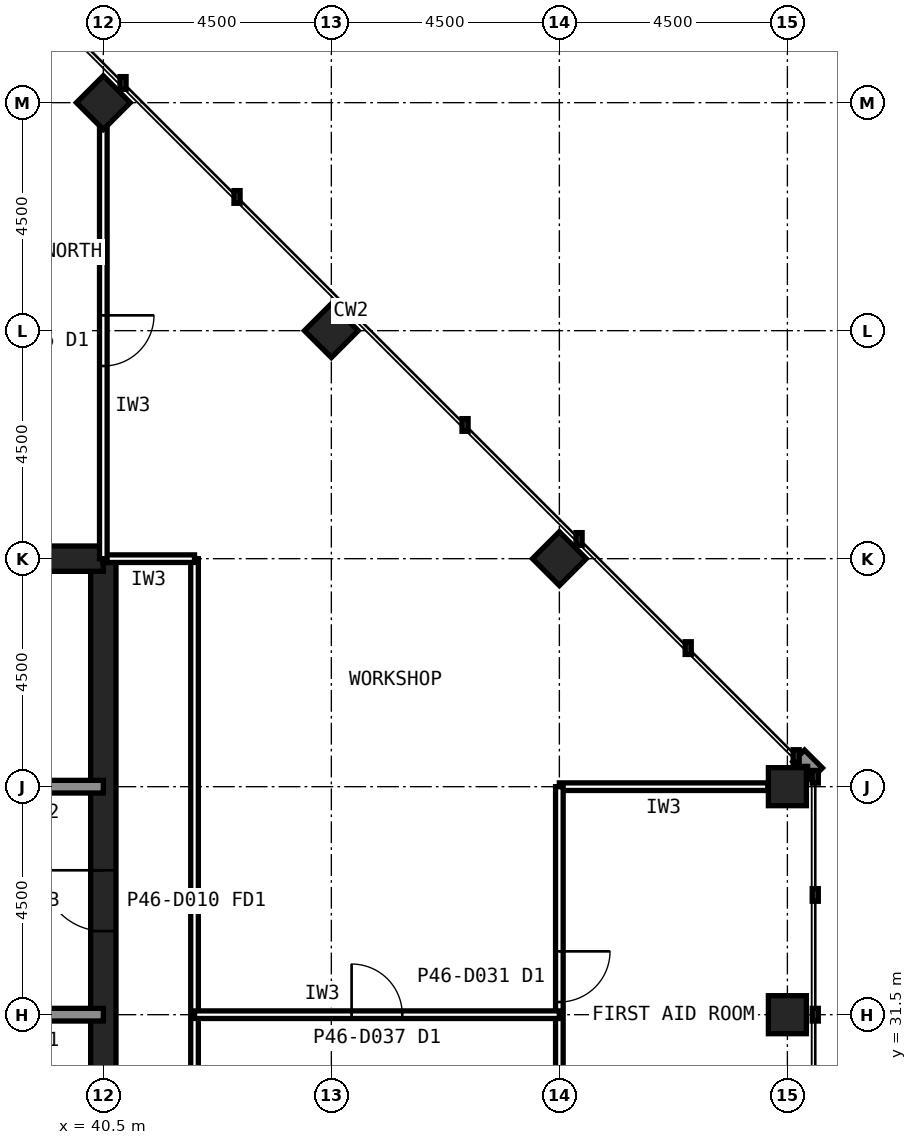
"""IFC4 building model, lengths in metres.
Left out: names, types, materials, properties, quantities, classifications, styles, units other than length and angle.
Written with IfcOpenShell. Run it as: python <this file> out.ifc"""

import sys

from ifc_helpers import new_model, si_unit, direction, frame, frame_2d, origin, origin_2d, place, context, subcontext, project, spatial, rectangle, hollow_rectangle, extrude, element, fill, save


model = new_model("IFC4")
c1 = context("Model", 3, precision=1e-05, world=origin(), true_north=direction((0.0, 1.0)))
c2 = subcontext(c1, "Body", "Model", "MODEL_VIEW")
j1 = project(units=[si_unit("LENGTHUNIT", "METRE"), si_unit("PLANEANGLEUNIT", "RADIAN")], contexts=[c1])
p1 = place(None, origin())
s1 = spatial("IfcSite", under=j1, at=p1, CompositionType="ELEMENT")
p2 = place(p1, origin())
s2 = spatial("IfcBuilding", under=s1, at=p2, CompositionType="ELEMENT")
p3 = place(p2, frame((0.0, 0.0, 191.6)))
s3 = spatial("IfcBuildingStorey", under=s2, at=p3, CompositionType="ELEMENT", Elevation=191.6)
for number, where, z_axis, x_axis in (
    (1, (54.0, 31.5, 0.0), (0.0, 0.0, 1.0), (1.0, 0.0, 0.0)),
    (2, (54.0, 36.0, 0.0), (0.0, 0.0, 1.0), (1.0, 0.0, 0.0)),
    (3, (49.5, 40.5, 0.0), (0.0, 0.0, 1.0), (0.707, 0.707, 0.0)),
    (4, (45.0, 45.0, 0.0), (0.0, 0.0, 1.0), (0.707, 0.707, 0.0)),
    (5, (40.5, 49.5, 0.0), (0.0, 0.0, 1.0), (0.707, 0.707, 0.0)),
):
    element("IfcColumn", number, at=place(p3, frame(where, z_axis=z_axis, x_axis=x_axis)), inside=s3, PredefinedType="COLUMN", context=c2, shape_type="SweptSolid", body=[
        extrude(hollow_rectangle(XDim=0.75, YDim=0.75, WallThickness=0.04, at=origin_2d()), origin(), (0.0, 0.0, 1.0), 4.0),
    ])
p4 = place(p3, frame((40.5, 13.5, 0.0), z_axis=(0.0, 0.0, 1.0), x_axis=(0.0, 1.0, 0.0)))
e6 = element("IfcWall", 6, at=p4, inside=s3, PredefinedType="SHEAR", context=c2, shape_type="SweptSolid", body=[
    extrude(rectangle(XDim=27.0, YDim=0.5, at=frame_2d((13.5, 0.0))), origin(), (0.0, 0.0, 1.0), 4.0),
])
p5 = place(p4, frame((5.85, 0.0, 0.0)))
e7 = element("IfcOpeningElement", 7, at=p5, cuts=e6, PredefinedType="OPENING", context=c2, shape_type="SweptSolid", body=[
    extrude(rectangle(XDim=1.8, YDim=2.1, at=frame_2d((0.9, 1.05))), frame((0.0, 0.26, 0.0), z_axis=(0.0, -1.0, 0.0), x_axis=(1.0, 0.0, 0.0)), (0.0, 0.0, 1.0), 0.52),
])
p6 = place(p4, frame((19.65, 0.0, 0.0)))
e8 = element("IfcOpeningElement", 8, at=p6, cuts=e6, PredefinedType="OPENING", context=c2, shape_type="SweptSolid", body=[
    extrude(rectangle(XDim=1.2, YDim=2.1, at=frame_2d((0.6, 1.05))), frame((0.0, 0.26, 0.0), z_axis=(0.0, -1.0, 0.0), x_axis=(1.0, 0.0, 0.0)), (0.0, 0.0, 1.0), 0.52),
])
p7 = place(p3, frame((40.5, 40.5, 0.0), z_axis=(0.0, 0.0, 1.0), x_axis=(-1.0, 0.0, 0.0)))
e9 = element("IfcWall", 9, at=p7, inside=s3, PredefinedType="SHEAR", context=c2, shape_type="SweptSolid", body=[
    extrude(rectangle(XDim=27.0, YDim=0.5, at=frame_2d((13.5, 0.0))), origin(), (0.0, 0.0, 1.0), 4.0),
])
p8 = place(p3, frame((13.5, 36.0, 0.0), z_axis=(0.0, 0.0, 1.0), x_axis=(1.0, 0.0, 0.0)))
e10 = element("IfcWall", 10, at=p8, inside=s3, PredefinedType="SOLIDWALL", context=c2, shape_type="SweptSolid", body=[
    extrude(rectangle(XDim=27.0, YDim=0.25, at=frame_2d((13.5, 0.0))), origin(), (0.0, 0.0, 1.0), 3.84),
])
p9 = place(p8, frame((1.8, 0.0, 0.0)))
e11 = element("IfcOpeningElement", 11, at=p9, cuts=e10, PredefinedType="OPENING", context=c2, shape_type="SweptSolid", body=[
    extrude(rectangle(XDim=0.9, YDim=2.1, at=frame_2d((0.45, 1.05))), frame((0.0, 0.135, 0.0), z_axis=(0.0, -1.0, 0.0), x_axis=(1.0, 0.0, 0.0)), (0.0, 0.0, 1.0), 0.27),
])
p10 = place(p8, frame((5.55, 0.0, 0.0)))
e12 = element("IfcOpeningElement", 12, at=p10, cuts=e10, PredefinedType="OPENING", context=c2, shape_type="SweptSolid", body=[
    extrude(rectangle(XDim=0.9, YDim=2.1, at=frame_2d((0.45, 1.05))), frame((0.0, 0.135, 0.0), z_axis=(0.0, -1.0, 0.0), x_axis=(1.0, 0.0, 0.0)), (0.0, 0.0, 1.0), 0.27),
])
p11 = place(p8, frame((8.55, 0.0, 0.0)))
e13 = element("IfcOpeningElement", 13, at=p11, cuts=e10, PredefinedType="OPENING", context=c2, shape_type="SweptSolid", body=[
    extrude(rectangle(XDim=0.9, YDim=2.1, at=frame_2d((0.45, 1.05))), frame((0.0, 0.135, 0.0), z_axis=(0.0, -1.0, 0.0), x_axis=(1.0, 0.0, 0.0)), (0.0, 0.0, 1.0), 0.27),
])
p12 = place(p8, frame((11.55, 0.0, 0.0)))
e14 = element("IfcOpeningElement", 14, at=p12, cuts=e10, PredefinedType="OPENING", context=c2, shape_type="SweptSolid", body=[
    extrude(rectangle(XDim=0.9, YDim=2.1, at=frame_2d((0.45, 1.05))), frame((0.0, 0.135, 0.0), z_axis=(0.0, -1.0, 0.0), x_axis=(1.0, 0.0, 0.0)), (0.0, 0.0, 1.0), 0.27),
])
p13 = place(p8, frame((24.1, 0.0, 0.0)))
e15 = element("IfcOpeningElement", 15, at=p13, cuts=e10, PredefinedType="OPENING", context=c2, shape_type="SweptSolid", body=[
    extrude(rectangle(XDim=1.3, YDim=2.2, at=frame_2d((0.65, 1.1))), frame((0.0, 0.135, 0.0), z_axis=(0.0, -1.0, 0.0), x_axis=(1.0, 0.0, 0.0)), (0.0, 0.0, 1.0), 0.27),
])
p14 = place(p3, frame((13.5, 31.5, 0.0), z_axis=(0.0, 0.0, 1.0), x_axis=(1.0, 0.0, 0.0)))
e16 = element("IfcWall", 16, at=p14, inside=s3, PredefinedType="SOLIDWALL", context=c2, shape_type="SweptSolid", body=[
    extrude(rectangle(XDim=27.0, YDim=0.25, at=frame_2d((13.5, 0.0))), origin(), (0.0, 0.0, 1.0), 3.84),
])
p15 = place(p14, frame((24.15, 0.0, 0.0)))
e17 = element("IfcOpeningElement", 17, at=p15, cuts=e16, PredefinedType="OPENING", context=c2, shape_type="SweptSolid", body=[
    extrude(rectangle(XDim=1.2, YDim=2.1, at=frame_2d((0.6, 1.05))), frame((0.0, 0.135, 0.0), z_axis=(0.0, -1.0, 0.0), x_axis=(1.0, 0.0, 0.0)), (0.0, 0.0, 1.0), 0.27),
])
p16 = place(p14, frame((15.3, 0.0, 0.0)))
e18 = element("IfcOpeningElement", 18, at=p16, cuts=e16, PredefinedType="OPENING", context=c2, shape_type="SweptSolid", body=[
    extrude(rectangle(XDim=0.9, YDim=2.1, at=frame_2d((0.45, 1.05))), frame((0.0, 0.135, 0.0), z_axis=(0.0, -1.0, 0.0), x_axis=(1.0, 0.0, 0.0)), (0.0, 0.0, 1.0), 0.27),
])
p17 = place(p14, frame((19.8, 0.0, 0.0)))
e19 = element("IfcOpeningElement", 19, at=p17, cuts=e16, PredefinedType="OPENING", context=c2, shape_type="SweptSolid", body=[
    extrude(rectangle(XDim=0.9, YDim=2.1, at=frame_2d((0.45, 1.05))), frame((0.0, 0.135, 0.0), z_axis=(0.0, -1.0, 0.0), x_axis=(1.0, 0.0, 0.0)), (0.0, 0.0, 1.0), 0.27),
])
p18 = place(p3, frame((42.3, 11.7, 0.0), z_axis=(0.0, 0.0, 1.0), x_axis=(0.0, 1.0, 0.0)))
e20 = element("IfcWall", 20, at=p18, inside=s3, PredefinedType="PARTITIONING", context=c2, shape_type="SweptSolid", body=[
    extrude(rectangle(XDim=30.6, YDim=0.15, at=frame_2d((15.3, 0.0))), origin(), (0.0, 0.0, 1.0), 3.84),
])
p19 = place(p18, frame((14.8, 0.0, 0.0)))
e21 = element("IfcOpeningElement", 21, at=p19, cuts=e20, PredefinedType="OPENING", context=c2, shape_type="SweptSolid", body=[
    extrude(rectangle(XDim=1.0, YDim=2.1, at=frame_2d((0.5, 1.05))), frame((0.0, 0.085, 0.0), z_axis=(0.0, -1.0, 0.0), x_axis=(1.0, 0.0, 0.0)), (0.0, 0.0, 1.0), 0.17),
])
p20 = place(p3, frame((42.3, 42.3, 0.0), z_axis=(0.0, 0.0, 1.0), x_axis=(-1.0, 0.0, 0.0)))
e22 = element("IfcWall", 22, at=p20, inside=s3, PredefinedType="PARTITIONING", context=c2, shape_type="SweptSolid", body=[
    extrude(rectangle(XDim=4.5, YDim=0.15, at=frame_2d((2.25, 0.0))), origin(), (0.0, 0.0, 1.0), 3.84),
])
p21 = place(p3, frame((53.615, 36.0, 0.0), z_axis=(0.0, 0.0, 1.0), x_axis=(-1.0, 0.0, 0.0)))
e23 = element("IfcWall", 23, at=p21, inside=s3, PredefinedType="PARTITIONING", context=c2, shape_type="SweptSolid", body=[
    extrude(rectangle(XDim=4.115, YDim=0.15, at=frame_2d((2.058, 0.0))), origin(), (0.0, 0.0, 1.0), 2.989),
])
p22 = place(p3, frame((49.5, 36.0, 0.0), z_axis=(0.0, 0.0, 1.0), x_axis=(0.0, -1.0, 0.0)))
e24 = element("IfcWall", 24, at=p22, inside=s3, PredefinedType="PARTITIONING", context=c2, shape_type="SweptSolid", body=[
    extrude(rectangle(XDim=9.0, YDim=0.15, at=frame_2d((4.5, 0.0))), origin(), (0.0, 0.0, 1.0), 3.84),
])
p23 = place(p22, frame((3.25, 0.0, 0.0)))
e25 = element("IfcOpeningElement", 25, at=p23, cuts=e24, PredefinedType="OPENING", context=c2, shape_type="SweptSolid", body=[
    extrude(rectangle(XDim=1.0, YDim=2.1, at=frame_2d((0.5, 1.05))), frame((0.0, 0.085, 0.0), z_axis=(0.0, -1.0, 0.0), x_axis=(1.0, 0.0, 0.0)), (0.0, 0.0, 1.0), 0.17),
])
p24 = place(p3, frame((40.5, 49.105, 0.0), z_axis=(0.0, 0.0, 1.0), x_axis=(0.0, -1.0, 0.0)))
e26 = element("IfcWall", 26, at=p24, inside=s3, PredefinedType="PARTITIONING", context=c2, shape_type="SweptSolid", body=[
    extrude(rectangle(XDim=6.805, YDim=0.15, at=frame_2d((3.402, 0.0))), origin(), (0.0, 0.0, 1.0), 2.989),
])
p25 = place(p24, frame((2.903, 0.0, 0.0)))
e27 = element("IfcOpeningElement", 27, at=p25, cuts=e26, PredefinedType="OPENING", context=c2, shape_type="SweptSolid", body=[
    extrude(rectangle(XDim=1.0, YDim=2.1, at=frame_2d((0.5, 1.05))), frame((0.0, 0.085, 0.0), z_axis=(0.0, -1.0, 0.0), x_axis=(1.0, 0.0, 0.0)), (0.0, 0.0, 1.0), 0.17),
])
p26 = place(p3, frame((42.3, 31.5, 0.0), z_axis=(0.0, 0.0, 1.0), x_axis=(1.0, 0.0, 0.0)))
e28 = element("IfcWall", 28, at=p26, inside=s3, PredefinedType="PARTITIONING", context=c2, shape_type="SweptSolid", body=[
    extrude(rectangle(XDim=7.2, YDim=0.15, at=frame_2d((3.6, 0.0))), origin(), (0.0, 0.0, 1.0), 2.989),
])
p27 = place(p26, frame((3.1, 0.0, 0.0)))
e29 = element("IfcOpeningElement", 29, at=p27, cuts=e28, PredefinedType="OPENING", context=c2, shape_type="SweptSolid", body=[
    extrude(rectangle(XDim=1.0, YDim=2.1, at=frame_2d((0.5, 1.05))), frame((0.0, 0.085, 0.0), z_axis=(0.0, -1.0, 0.0), x_axis=(1.0, 0.0, 0.0)), (0.0, 0.0, 1.0), 0.17),
])
p28 = place(p6, origin())
e30 = element("IfcDoor", 30, at=p28, inside=s3, OperationType="SINGLE_SWING_RIGHT", PredefinedType="DOOR", context=c2, shape_type="SweptSolid", body=[
    extrude(rectangle(XDim=1.2, YDim=2.1, at=frame_2d((0.6, 1.05))), frame((0.0, 0.025, 0.0), z_axis=(0.0, -1.0, 0.0), x_axis=(1.0, 0.0, 0.0)), (0.0, 0.0, 1.0), 0.05),
])
fill(e8, e30)
p29 = place(p23, origin())
e31 = element("IfcDoor", 31, at=p29, inside=s3, OperationType="SINGLE_SWING_LEFT", PredefinedType="DOOR", context=c2, shape_type="SweptSolid", body=[
    extrude(rectangle(XDim=1.0, YDim=2.1, at=frame_2d((0.5, 1.05))), frame((0.0, 0.025, 0.0), z_axis=(0.0, -1.0, 0.0), x_axis=(1.0, 0.0, 0.0)), (0.0, 0.0, 1.0), 0.05),
])
fill(e25, e31)
p30 = place(p25, origin())
e32 = element("IfcDoor", 32, at=p30, inside=s3, OperationType="SINGLE_SWING_LEFT", PredefinedType="DOOR", context=c2, shape_type="SweptSolid", body=[
    extrude(rectangle(XDim=1.0, YDim=2.1, at=frame_2d((0.5, 1.05))), frame((0.0, 0.025, 0.0), z_axis=(0.0, -1.0, 0.0), x_axis=(1.0, 0.0, 0.0)), (0.0, 0.0, 1.0), 0.05),
])
fill(e27, e32)
p31 = place(p27, origin())
e33 = element("IfcDoor", 33, at=p31, inside=s3, OperationType="SINGLE_SWING_LEFT", PredefinedType="DOOR", context=c2, shape_type="SweptSolid", body=[
    extrude(rectangle(XDim=1.0, YDim=2.1, at=frame_2d((0.5, 1.05))), frame((0.0, 0.025, 0.0), z_axis=(0.0, -1.0, 0.0), x_axis=(1.0, 0.0, 0.0)), (0.0, 0.0, 1.0), 0.05),
])
fill(e29, e33)
save(model, sys.argv[1])
